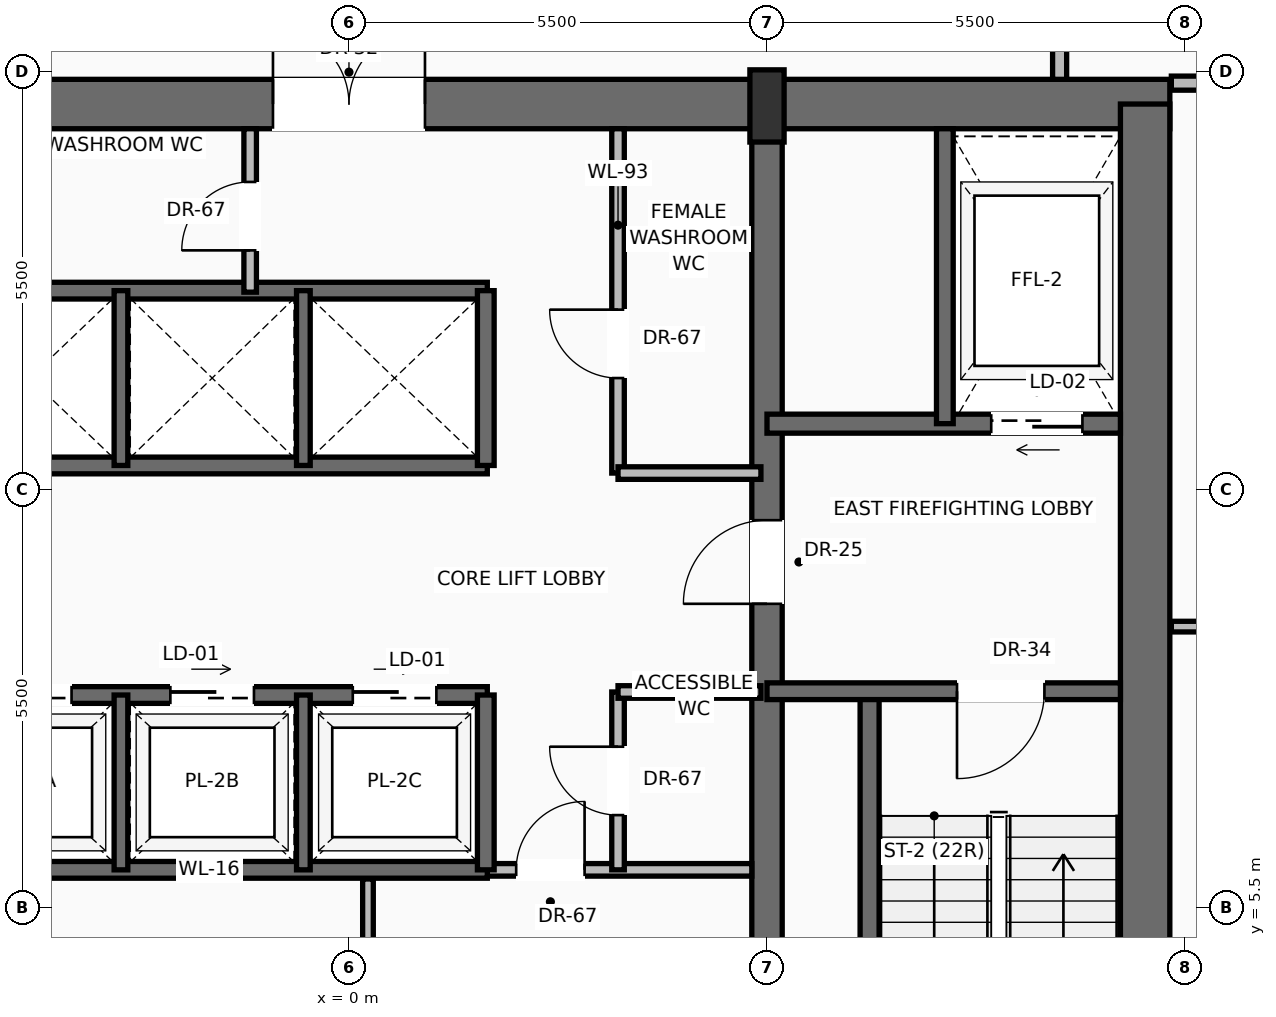
"""IFC4 building model, lengths in metres.
Left out: names, types, materials, properties, quantities, classifications, styles, units other than length and angle.
Written with IfcOpenShell. Run it as: python <this file> out.ifc"""

import sys

from ifc_helpers import new_model, si_unit, direction, frame, frame_2d, origin, origin_2d, place, context, subcontext, project, spatial, rectangle, extrude, source, transform, mapped, element, fill, save


model = new_model("IFC4")
c1 = context("Model", 3, precision=1e-05, world=origin(), true_north=direction((0.0, 1.0)))
c2 = subcontext(c1, "Body", "Model", "MODEL_VIEW")
j1 = project(units=[si_unit("LENGTHUNIT", "METRE"), si_unit("PLANEANGLEUNIT", "RADIAN")], contexts=[c1])
p1 = place(None, origin())
s1 = spatial("IfcSite", under=j1, at=p1, CompositionType="ELEMENT")
p2 = place(p1, origin())
s2 = spatial("IfcBuilding", under=s1, at=p2, CompositionType="ELEMENT")
p3 = place(p2, frame((0.0, 0.0, 171.0)))
s3 = spatial("IfcBuildingStorey", under=s2, at=p3, CompositionType="ELEMENT", Elevation=171.0)
p4 = place(p3, frame((-10.8, 16.075, 0.0), z_axis=(0.0, 0.0, 1.0), x_axis=(1.0, 0.0, 0.0)))
e1 = element("IfcWall", 1, at=p4, inside=s3, PredefinedType="SHEAR", context=c2, shape_type="SweptSolid", body=[
    extrude(rectangle(XDim=21.6, YDim=0.65, at=frame_2d((10.8, 0.0))), origin(), (0.0, 0.0, 1.0), 3.47),
])
p5 = place(p4, frame((3.37, 0.0, 0.0)))
e2 = element("IfcOpeningElement", 2, at=p5, cuts=e1, PredefinedType="OPENING", context=c2, shape_type="SweptSolid", body=[
    extrude(rectangle(XDim=1.3, YDim=2.3, at=frame_2d((0.65, 1.15))), frame((0.0, 0.335, 0.0), z_axis=(0.0, -1.0, 0.0), x_axis=(1.0, 0.0, 0.0)), (0.0, 0.0, 1.0), 0.67),
])
p6 = place(p4, frame((9.8, 0.0, 0.0)))
e3 = element("IfcOpeningElement", 3, at=p6, cuts=e1, PredefinedType="OPENING", context=c2, shape_type="SweptSolid", body=[
    extrude(rectangle(XDim=2.0, YDim=2.4, at=frame_2d((1.0, 1.2))), frame((0.0, 0.335, 0.0), z_axis=(0.0, -1.0, 0.0), x_axis=(1.0, 0.0, 0.0)), (0.0, 0.0, 1.0), 0.67),
])
p7 = place(p3, frame((10.475, 0.525, 0.0), z_axis=(0.0, 0.0, 1.0), x_axis=(0.0, 1.0, 0.0)))
e4 = element("IfcWall", 4, at=p7, inside=s3, PredefinedType="SHEAR", context=c2, shape_type="SweptSolid", body=[
    extrude(rectangle(XDim=15.55, YDim=0.65, at=frame_2d((7.775, 0.0))), origin(), (0.0, 0.0, 1.0), 3.47),
])
p8 = place(p3, frame((5.5, 0.525, 0.0), z_axis=(0.0, 0.0, 1.0), x_axis=(0.0, 1.0, 0.0)))
e5 = element("IfcWall", 5, at=p8, inside=s3, PredefinedType="SHEAR", context=c2, shape_type="SweptSolid", body=[
    extrude(rectangle(XDim=15.55, YDim=0.4, at=frame_2d((7.775, 0.0))), origin(), (0.0, 0.0, 1.0), 3.47),
])
p9 = place(p8, frame((8.975, 0.0, 0.0)))
e6 = element("IfcOpeningElement", 6, at=p9, cuts=e5, PredefinedType="OPENING", context=c2, shape_type="SweptSolid", body=[
    extrude(rectangle(XDim=1.1, YDim=2.2, at=frame_2d((0.55, 1.1))), frame((0.0, 0.21, 0.0), z_axis=(0.0, -1.0, 0.0), x_axis=(1.0, 0.0, 0.0)), (0.0, 0.0, 1.0), 0.42),
])
m1 = source(origin(), c2, "Body", "SweptSolid", [
    extrude(rectangle(XDim=0.45, YDim=0.95, at=origin_2d()), origin(), (0.0, 0.0, 1.0), 3.7),
])
p10 = place(p3, frame((5.5, 16.05, 0.0), z_axis=(0.0, 0.0, 1.0), x_axis=(1.0, 0.0, 0.0)))
e7 = element("IfcColumn", 7, at=p10, inside=s3, PredefinedType="PILASTER", context=c2, shape_type="MappedRepresentation", body=[
    mapped(m1, transform((0.0, 0.0, 0.0), scale=1.0)),
])
p11 = place(p3, frame((10.395, 32.504, 0.0), z_axis=(0.0, 0.0, 1.0), x_axis=(0.535922647913, -0.844267087748, 0.0)))
e8 = element("IfcWall", 8, at=p11, inside=s3, PredefinedType="SOLIDWALL", context=c2, shape_type="SweptSolid", body=[
    extrude(rectangle(XDim=18.642, YDim=0.28, at=frame_2d((9.321, 0.0))), origin(), (0.0, 0.0, 1.0), 3.05),
])
p12 = place(p11, frame((4.474, 0.0, 0.0)))
e9 = element("IfcOpeningElement", 9, at=p12, cuts=e8, PredefinedType="OPENING", context=c2, shape_type="SweptSolid", body=[
    extrude(rectangle(XDim=1.6, YDim=2.35, at=frame_2d((0.8, 1.175))), frame((0.0, 0.15, 0.0), z_axis=(0.0, -1.0, 0.0), x_axis=(1.0, 0.0, 0.0)), (0.0, 0.0, 1.0), 0.3),
])
p13 = place(p11, frame((12.677, 0.0, 0.9)))
e10 = element("IfcOpeningElement", 10, at=p13, cuts=e8, PredefinedType="OPENING", context=c2, shape_type="SweptSolid", body=[
    extrude(rectangle(XDim=1.55, YDim=1.85, at=frame_2d((0.775, 0.925))), frame((0.0, 0.15, 0.0), z_axis=(0.0, -1.0, 0.0), x_axis=(1.0, 0.0, 0.0)), (0.0, 0.0, 1.0), 0.3),
])
p14 = place(p3, frame((6.85, 0.85, 0.0), z_axis=(0.0, 0.0, 1.0), x_axis=(0.0, 1.0, 0.0)))
e11 = element("IfcWall", 11, at=p14, inside=s3, PredefinedType="SOLIDWALL", context=c2, shape_type="SweptSolid", body=[
    extrude(rectangle(XDim=7.5, YDim=0.25, at=frame_2d((3.75, 0.0))), origin(), (0.0, 0.0, 1.0), 3.47),
])
p15 = place(p3, frame((10.15, 8.35, 0.0), z_axis=(0.0, 0.0, 1.0), x_axis=(-1.0, 0.0, 0.0)))
e12 = element("IfcWall", 12, at=p15, inside=s3, PredefinedType="SOLIDWALL", context=c2, shape_type="SweptSolid", body=[
    extrude(rectangle(XDim=4.65, YDim=0.22, at=frame_2d((2.325, 0.0))), origin(), (0.0, 0.0, 1.0), 3.47),
])
p16 = place(p15, frame((1.0, 0.0, 0.0)))
e13 = element("IfcOpeningElement", 13, at=p16, cuts=e12, PredefinedType="OPENING", context=c2, shape_type="SweptSolid", body=[
    extrude(rectangle(XDim=1.15, YDim=2.2, at=frame_2d((0.575, 1.1))), frame((0.0, 0.12, 0.0), z_axis=(0.0, -1.0, 0.0), x_axis=(1.0, 0.0, 0.0)), (0.0, 0.0, 1.0), 0.24),
])
p17 = place(p3, frame((10.15, 11.87, 0.0), z_axis=(0.0, 0.0, 1.0), x_axis=(-1.0, 0.0, 0.0)))
e14 = element("IfcWall", 14, at=p17, inside=s3, PredefinedType="SOLIDWALL", context=c2, shape_type="SweptSolid", body=[
    extrude(rectangle(XDim=4.65, YDim=0.25, at=frame_2d((2.325, 0.0))), origin(), (0.0, 0.0, 1.0), 3.47),
])
p18 = place(p17, frame((0.5, 0.0, 0.0)))
e15 = element("IfcOpeningElement", 15, at=p18, cuts=e14, PredefinedType="OPENING", context=c2, shape_type="SweptSolid", body=[
    extrude(rectangle(XDim=1.2, YDim=2.25, at=frame_2d((0.6, 1.125))), frame((0.0, 0.135, 0.0), z_axis=(0.0, -1.0, 0.0), x_axis=(1.0, 0.0, 0.0)), (0.0, 0.0, 1.0), 0.27),
])
p19 = place(p3, frame((7.84, 11.87, 0.0), z_axis=(0.0, 0.0, 1.0), x_axis=(0.0, 1.0, 0.0)))
e16 = element("IfcWall", 16, at=p19, inside=s3, PredefinedType="SOLIDWALL", context=c2, shape_type="SweptSolid", body=[
    extrude(rectangle(XDim=3.88, YDim=0.22, at=frame_2d((1.94, 0.0))), origin(), (0.0, 0.0, 1.0), 3.47),
])
p20 = place(p3, frame((1.82, 6.0, 0.0), z_axis=(0.0, 0.0, 1.0), x_axis=(1.0, 0.0, 0.0)))
e17 = element("IfcWall", 17, at=p20, inside=s3, PredefinedType="PARTITIONING", context=c2, shape_type="SweptSolid", body=[
    extrude(rectangle(XDim=3.48, YDim=0.165, at=frame_2d((1.74, 0.0))), origin(), (0.0, 0.0, 1.0), 3.462),
])
p21 = place(p20, frame((0.38, 0.0, 0.0)))
e18 = element("IfcOpeningElement", 18, at=p21, cuts=e17, PredefinedType="OPENING", context=c2, shape_type="SweptSolid", body=[
    extrude(rectangle(XDim=0.9, YDim=2.1, at=frame_2d((0.45, 1.05))), frame((0.0, 0.093, 0.0), z_axis=(0.0, -1.0, 0.0), x_axis=(1.0, 0.0, 0.0)), (0.0, 0.0, 1.0), 0.185),
])
p22 = place(p3, frame((0.25, 0.85, 0.0), z_axis=(0.0, 0.0, 1.0), x_axis=(0.0, 1.0, 0.0)))
e19 = element("IfcWall", 19, at=p22, inside=s3, PredefinedType="PARTITIONING", context=c2, shape_type="SweptSolid", body=[
    extrude(rectangle(XDim=5.03, YDim=0.14, at=frame_2d((2.515, 0.0))), origin(), (0.0, 0.0, 1.0), 3.462),
])
p23 = place(p22, frame((2.1, 0.0, 0.0)))
e20 = element("IfcOpeningElement", 20, at=p23, cuts=e19, PredefinedType="OPENING", context=c2, shape_type="SweptSolid", body=[
    extrude(rectangle(XDim=0.9, YDim=2.1, at=frame_2d((0.45, 1.05))), frame((0.0, 0.08, 0.0), z_axis=(0.0, -1.0, 0.0), x_axis=(1.0, 0.0, 0.0)), (0.0, 0.0, 1.0), 0.16),
])
p24 = place(p3, frame((3.54, 6.0, 0.0), z_axis=(0.0, 0.0, 1.0), x_axis=(0.0, 1.0, 0.0)))
e21 = element("IfcWall", 21, at=p24, inside=s3, PredefinedType="PARTITIONING", context=c2, shape_type="SweptSolid", body=[
    extrude(rectangle(XDim=2.34, YDim=0.165, at=frame_2d((1.17, 0.0))), origin(), (0.0, 0.0, 1.0), 3.462),
])
p25 = place(p24, frame((0.72, 0.0, 0.0)))
e22 = element("IfcOpeningElement", 22, at=p25, cuts=e21, PredefinedType="OPENING", context=c2, shape_type="SweptSolid", body=[
    extrude(rectangle(XDim=0.9, YDim=2.1, at=frame_2d((0.45, 1.05))), frame((0.0, 0.093, 0.0), z_axis=(0.0, -1.0, 0.0), x_axis=(1.0, 0.0, 0.0)), (0.0, 0.0, 1.0), 0.185),
])
p26 = place(p3, frame((3.54, 8.34, 0.0), z_axis=(0.0, 0.0, 1.0), x_axis=(1.0, 0.0, 0.0)))
e23 = element("IfcWall", 23, at=p26, inside=s3, PredefinedType="PARTITIONING", context=c2, shape_type="SweptSolid", body=[
    extrude(rectangle(XDim=1.88, YDim=0.165, at=frame_2d((0.94, 0.0))), origin(), (0.0, 0.0, 1.0), 3.462),
])
p27 = place(p3, frame((-5.5, 6.0, 0.0), z_axis=(0.0, 0.0, 1.0), x_axis=(1.0, 0.0, 0.0)))
e24 = element("IfcWall", 24, at=p27, inside=s3, PredefinedType="SOLIDWALL", context=c2, shape_type="SweptSolid", body=[
    extrude(rectangle(XDim=7.32, YDim=0.22, at=frame_2d((3.66, 0.0))), origin(), (0.0, 0.0, 1.0), 3.47),
])
p28 = place(p3, frame((-5.5, 8.3, 0.0), z_axis=(0.0, 0.0, 1.0), x_axis=(1.0, 0.0, 0.0)))
e25 = element("IfcWall", 25, at=p28, inside=s3, PredefinedType="SOLIDWALL", context=c2, shape_type="SweptSolid", body=[
    extrude(rectangle(XDim=7.32, YDim=0.22, at=frame_2d((3.66, 0.0))), origin(), (0.0, 0.0, 1.0), 3.47),
])
p29 = place(p28, frame((0.75, 0.0, 0.0)))
e26 = element("IfcOpeningElement", 26, at=p29, cuts=e25, PredefinedType="OPENING", context=c2, shape_type="SweptSolid", body=[
    extrude(rectangle(XDim=1.1, YDim=2.2, at=frame_2d((0.55, 1.1))), frame((0.0, 0.12, 0.0), z_axis=(0.0, -1.0, 0.0), x_axis=(1.0, 0.0, 0.0)), (0.0, 0.0, 1.0), 0.24),
])
p30 = place(p28, frame((3.15, 0.0, 0.0)))
e27 = element("IfcOpeningElement", 27, at=p30, cuts=e25, PredefinedType="OPENING", context=c2, shape_type="SweptSolid", body=[
    extrude(rectangle(XDim=1.1, YDim=2.2, at=frame_2d((0.55, 1.1))), frame((0.0, 0.12, 0.0), z_axis=(0.0, -1.0, 0.0), x_axis=(1.0, 0.0, 0.0)), (0.0, 0.0, 1.0), 0.24),
])
p31 = place(p28, frame((5.55, 0.0, 0.0)))
e28 = element("IfcOpeningElement", 28, at=p31, cuts=e25, PredefinedType="OPENING", context=c2, shape_type="SweptSolid", body=[
    extrude(rectangle(XDim=1.1, YDim=2.2, at=frame_2d((0.55, 1.1))), frame((0.0, 0.12, 0.0), z_axis=(0.0, -1.0, 0.0), x_axis=(1.0, 0.0, 0.0)), (0.0, 0.0, 1.0), 0.24),
])
p32 = place(p3, frame((1.8, 6.0, 0.0), z_axis=(0.0, 0.0, 1.0), x_axis=(0.0, 1.0, 0.0)))
e29 = element("IfcWall", 29, at=p32, inside=s3, PredefinedType="SOLIDWALL", context=c2, shape_type="SweptSolid", body=[
    extrude(rectangle(XDim=2.3, YDim=0.22, at=frame_2d((1.15, 0.0))), origin(), (0.0, 0.0, 1.0), 3.47),
])
for number, where, z_axis, x_axis in (
    (30, (-3.0, 6.0, 0.0), (0.0, 0.0, 1.0), (0.0, 1.0, 0.0)),
    (31, (-0.6, 6.0, 0.0), (0.0, 0.0, 1.0), (0.0, 1.0, 0.0)),
):
    element("IfcWall", number, at=place(p3, frame(where, z_axis=z_axis, x_axis=x_axis)), inside=s3, PredefinedType="SOLIDWALL", context=c2, shape_type="SweptSolid", body=[
        extrude(rectangle(XDim=2.3, YDim=0.18, at=frame_2d((1.15, 0.0))), origin(), (0.0, 0.0, 1.0), 3.47),
    ])
for number, where, z_axis, x_axis in (
    (32, (-5.5, 11.32, 0.0), (0.0, 0.0, 1.0), (1.0, 0.0, 0.0)),
    (33, (-5.5, 13.62, 0.0), (0.0, 0.0, 1.0), (1.0, 0.0, 0.0)),
):
    element("IfcWall", number, at=place(p3, frame(where, z_axis=z_axis, x_axis=x_axis)), inside=s3, PredefinedType="SOLIDWALL", context=c2, shape_type="SweptSolid", body=[
        extrude(rectangle(XDim=7.32, YDim=0.22, at=frame_2d((3.66, 0.0))), origin(), (0.0, 0.0, 1.0), 3.47),
    ])
p33 = place(p3, frame((1.8, 11.32, 0.0), z_axis=(0.0, 0.0, 1.0), x_axis=(0.0, 1.0, 0.0)))
e34 = element("IfcWall", 34, at=p33, inside=s3, PredefinedType="SOLIDWALL", context=c2, shape_type="SweptSolid", body=[
    extrude(rectangle(XDim=2.3, YDim=0.22, at=frame_2d((1.15, 0.0))), origin(), (0.0, 0.0, 1.0), 3.47),
])
for number, where, z_axis, x_axis in (
    (35, (-3.0, 11.32, 0.0), (0.0, 0.0, 1.0), (0.0, 1.0, 0.0)),
    (36, (-0.6, 11.32, 0.0), (0.0, 0.0, 1.0), (0.0, 1.0, 0.0)),
):
    element("IfcWall", number, at=place(p3, frame(where, z_axis=z_axis, x_axis=x_axis)), inside=s3, PredefinedType="SOLIDWALL", context=c2, shape_type="SweptSolid", body=[
        extrude(rectangle(XDim=2.3, YDim=0.18, at=frame_2d((1.15, 0.0))), origin(), (0.0, 0.0, 1.0), 3.47),
    ])
p34 = place(p3, frame((-1.3, 13.6, 0.0), z_axis=(0.0, 0.0, 1.0), x_axis=(0.0, 1.0, 0.0)))
e37 = element("IfcWall", 37, at=p34, inside=s3, PredefinedType="PARTITIONING", context=c2, shape_type="SweptSolid", body=[
    extrude(rectangle(XDim=2.15, YDim=0.165, at=frame_2d((1.075, 0.0))), origin(), (0.0, 0.0, 1.0), 3.462),
])
p35 = place(p34, frame((0.55, 0.0, 0.0)))
e38 = element("IfcOpeningElement", 38, at=p35, cuts=e37, PredefinedType="OPENING", context=c2, shape_type="SweptSolid", body=[
    extrude(rectangle(XDim=0.9, YDim=2.1, at=frame_2d((0.45, 1.05))), frame((0.0, 0.093, 0.0), z_axis=(0.0, -1.0, 0.0), x_axis=(1.0, 0.0, 0.0)), (0.0, 0.0, 1.0), 0.185),
])
p36 = place(p3, frame((3.54, 11.22, 0.0), z_axis=(0.0, 0.0, 1.0), x_axis=(0.0, 1.0, 0.0)))
e39 = element("IfcWall", 39, at=p36, inside=s3, PredefinedType="PARTITIONING", context=c2, shape_type="SweptSolid", body=[
    extrude(rectangle(XDim=4.53, YDim=0.165, at=frame_2d((2.265, 0.0))), origin(), (0.0, 0.0, 1.0), 3.462),
])
p37 = place(p36, frame((1.25, 0.0, 0.0)))
e40 = element("IfcOpeningElement", 40, at=p37, cuts=e39, PredefinedType="OPENING", context=c2, shape_type="SweptSolid", body=[
    extrude(rectangle(XDim=0.9, YDim=2.1, at=frame_2d((0.45, 1.05))), frame((0.0, 0.093, 0.0), z_axis=(0.0, -1.0, 0.0), x_axis=(1.0, 0.0, 0.0)), (0.0, 0.0, 1.0), 0.185),
])
p38 = place(p3, frame((3.54, 11.22, 0.0), z_axis=(0.0, 0.0, 1.0), x_axis=(1.0, 0.0, 0.0)))
e41 = element("IfcWall", 41, at=p38, inside=s3, PredefinedType="PARTITIONING", context=c2, shape_type="SweptSolid", body=[
    extrude(rectangle(XDim=1.88, YDim=0.165, at=frame_2d((0.94, 0.0))), origin(), (0.0, 0.0, 1.0), 3.462),
])
p39 = place(p3, frame((9.35, 16.4, 0.0), z_axis=(0.0, 0.0, 1.0), x_axis=(0.0, 1.0, 0.0)))
e42 = element("IfcWall", 42, at=p39, inside=s3, PredefinedType="PARTITIONING", context=c2, shape_type="SweptSolid", body=[
    extrude(rectangle(XDim=7.8, YDim=0.185, at=frame_2d((3.9, 0.0))), origin(), (0.0, 0.0, 1.0), 3.462),
])
p40 = place(p39, frame((3.781, 0.0, 0.0)))
e43 = element("IfcOpeningElement", 43, at=p40, cuts=e42, PredefinedType="OPENING", context=c2, shape_type="SweptSolid", body=[
    extrude(rectangle(XDim=0.95, YDim=2.2, at=frame_2d((0.475, 1.1))), frame((0.0, 0.103, 0.0), z_axis=(0.0, -1.0, 0.0), x_axis=(1.0, 0.0, 0.0)), (0.0, 0.0, 1.0), 0.205),
])
p41 = place(p3, frame((10.82, 16.35, 0.0), z_axis=(0.0, 0.0, 1.0), x_axis=(1.0, 0.0, 0.0)))
e44 = element("IfcWall", 44, at=p41, inside=s3, PredefinedType="PARTITIONING", context=c2, shape_type="SweptSolid", body=[
    extrude(rectangle(XDim=9.983, YDim=0.185, at=frame_2d((4.992, 0.0))), origin(), (0.0, 0.0, 1.0), 3.462),
])
p42 = place(p41, frame((3.121, 0.0, 0.0)))
e45 = element("IfcOpeningElement", 45, at=p42, cuts=e44, PredefinedType="OPENING", context=c2, shape_type="SweptSolid", body=[
    extrude(rectangle(XDim=0.95, YDim=2.2, at=frame_2d((0.475, 1.1))), frame((0.0, 0.103, 0.0), z_axis=(0.0, -1.0, 0.0), x_axis=(1.0, 0.0, 0.0)), (0.0, 0.0, 1.0), 0.205),
])
p43 = place(p3, frame((10.82, 9.2, 0.0), z_axis=(0.0, 0.0, 1.0), x_axis=(1.0, 0.0, 0.0)))
e46 = element("IfcWall", 46, at=p43, inside=s3, PredefinedType="PARTITIONING", context=c2, shape_type="SweptSolid", body=[
    extrude(rectangle(XDim=14.522, YDim=0.14, at=frame_2d((7.261, 0.0))), origin(), (0.0, 0.0, 1.0), 3.462),
])
p44 = place(p43, frame((6.778, 0.0, 0.0)))
e47 = element("IfcOpeningElement", 47, at=p44, cuts=e46, PredefinedType="OPENING", context=c2, shape_type="SweptSolid", body=[
    extrude(rectangle(XDim=0.95, YDim=2.2, at=frame_2d((0.475, 1.1))), frame((0.0, 0.08, 0.0), z_axis=(0.0, -1.0, 0.0), x_axis=(1.0, 0.0, 0.0)), (0.0, 0.0, 1.0), 0.16),
])
m2 = source(origin(), c2, "Body", "SweptSolid", [
    extrude(rectangle(XDim=1.15, YDim=2.2, at=frame_2d((0.575, 1.1))), frame((0.0, 0.025, 0.0), z_axis=(0.0, -1.0, 0.0), x_axis=(1.0, 0.0, 0.0)), (0.0, 0.0, 1.0), 0.05),
])
p45 = place(p16, origin())
e48 = element("IfcDoor", 48, at=p45, inside=s3, OperationType="SINGLE_SWING_RIGHT", PredefinedType="DOOR", context=c2, shape_type="MappedRepresentation", body=[
    mapped(m2, transform((0.0, 0.0, 0.0), scale=1.0)),
])
fill(e13, e48)
m3 = source(origin(), c2, "Body", "SweptSolid", [
    extrude(rectangle(XDim=1.1, YDim=2.2, at=frame_2d((0.55, 1.1))), frame((0.0, 0.025, 0.0), z_axis=(0.0, -1.0, 0.0), x_axis=(1.0, 0.0, 0.0)), (0.0, 0.0, 1.0), 0.05),
])
p46 = place(p9, origin())
e49 = element("IfcDoor", 49, at=p46, inside=s3, OperationType="SINGLE_SWING_LEFT", PredefinedType="DOOR", context=c2, shape_type="MappedRepresentation", body=[
    mapped(m3, transform((0.0, 0.0, 0.0), scale=1.0)),
])
fill(e6, e49)
m4 = source(origin(), c2, "Body", "SweptSolid", [
    extrude(rectangle(XDim=1.2, YDim=2.25, at=frame_2d((0.6, 1.125))), frame((0.0, 0.025, 0.0), z_axis=(0.0, -1.0, 0.0), x_axis=(1.0, 0.0, 0.0)), (0.0, 0.0, 1.0), 0.05),
])
p47 = place(p18, origin())
e50 = element("IfcDoor", 50, at=p47, inside=s3, OperationType="SLIDING_TO_RIGHT", PredefinedType="DOOR", context=c2, shape_type="MappedRepresentation", body=[
    mapped(m4, transform((0.0, 0.0, 0.0), scale=1.0)),
])
fill(e15, e50)
m5 = source(origin(), c2, "Body", "SweptSolid", [
    extrude(rectangle(XDim=2.0, YDim=2.4, at=frame_2d((1.0, 1.2))), frame((0.0, 0.025, 0.0), z_axis=(0.0, -1.0, 0.0), x_axis=(1.0, 0.0, 0.0)), (0.0, 0.0, 1.0), 0.05),
])
p48 = place(p6, origin())
e51 = element("IfcDoor", 51, at=p48, inside=s3, OperationType="DOUBLE_DOOR_SINGLE_SWING", PredefinedType="DOOR", context=c2, shape_type="MappedRepresentation", body=[
    mapped(m5, transform((0.0, 0.0, 0.0), scale=1.0)),
])
fill(e3, e51)
m6 = source(origin(), c2, "Body", "SweptSolid", [
    extrude(rectangle(XDim=0.9, YDim=2.1, at=frame_2d((0.45, 1.05))), frame((0.0, 0.025, 0.0), z_axis=(0.0, -1.0, 0.0), x_axis=(1.0, 0.0, 0.0)), (0.0, 0.0, 1.0), 0.05),
])
p49 = place(p21, origin())
e52 = element("IfcDoor", 52, at=p49, inside=s3, OperationType="SINGLE_SWING_RIGHT", PredefinedType="DOOR", context=c2, shape_type="MappedRepresentation", body=[
    mapped(m6, transform((0.0, 0.0, 0.0), scale=1.0)),
])
fill(e18, e52)
p50 = place(p25, origin())
e53 = element("IfcDoor", 53, at=p50, inside=s3, OperationType="SINGLE_SWING_RIGHT", PredefinedType="DOOR", context=c2, shape_type="MappedRepresentation", body=[
    mapped(m6, transform((0.0, 0.0, 0.0), scale=1.0)),
])
fill(e22, e53)
m7 = source(origin(), c2, "Body", "SweptSolid", [
    extrude(rectangle(XDim=1.1, YDim=2.2, at=frame_2d((0.55, 1.1))), frame((0.0, 0.025, 0.0), z_axis=(0.0, -1.0, 0.0), x_axis=(1.0, 0.0, 0.0)), (0.0, 0.0, 1.0), 0.05),
])
p51 = place(p29, origin())
e54 = element("IfcDoor", 54, at=p51, inside=s3, OperationType="SLIDING_TO_LEFT", PredefinedType="DOOR", context=c2, shape_type="MappedRepresentation", body=[
    mapped(m7, transform((0.0, 0.0, 0.0), scale=1.0)),
])
fill(e26, e54)
p52 = place(p30, origin())
e55 = element("IfcDoor", 55, at=p52, inside=s3, OperationType="SLIDING_TO_LEFT", PredefinedType="DOOR", context=c2, shape_type="MappedRepresentation", body=[
    mapped(m7, transform((0.0, 0.0, 0.0), scale=1.0)),
])
fill(e27, e55)
p53 = place(p31, origin())
e56 = element("IfcDoor", 56, at=p53, inside=s3, OperationType="SLIDING_TO_LEFT", PredefinedType="DOOR", context=c2, shape_type="MappedRepresentation", body=[
    mapped(m7, transform((0.0, 0.0, 0.0), scale=1.0)),
])
fill(e28, e56)
p54 = place(p35, origin())
e57 = element("IfcDoor", 57, at=p54, inside=s3, OperationType="SINGLE_SWING_LEFT", PredefinedType="DOOR", context=c2, shape_type="MappedRepresentation", body=[
    mapped(m6, transform((0.0, 0.0, 0.0), scale=1.0)),
])
fill(e38, e57)
p55 = place(p37, origin())
e58 = element("IfcDoor", 58, at=p55, inside=s3, OperationType="SINGLE_SWING_RIGHT", PredefinedType="DOOR", context=c2, shape_type="MappedRepresentation", body=[
    mapped(m6, transform((0.0, 0.0, 0.0), scale=1.0)),
])
fill(e40, e58)
save(model, sys.argv[1])
